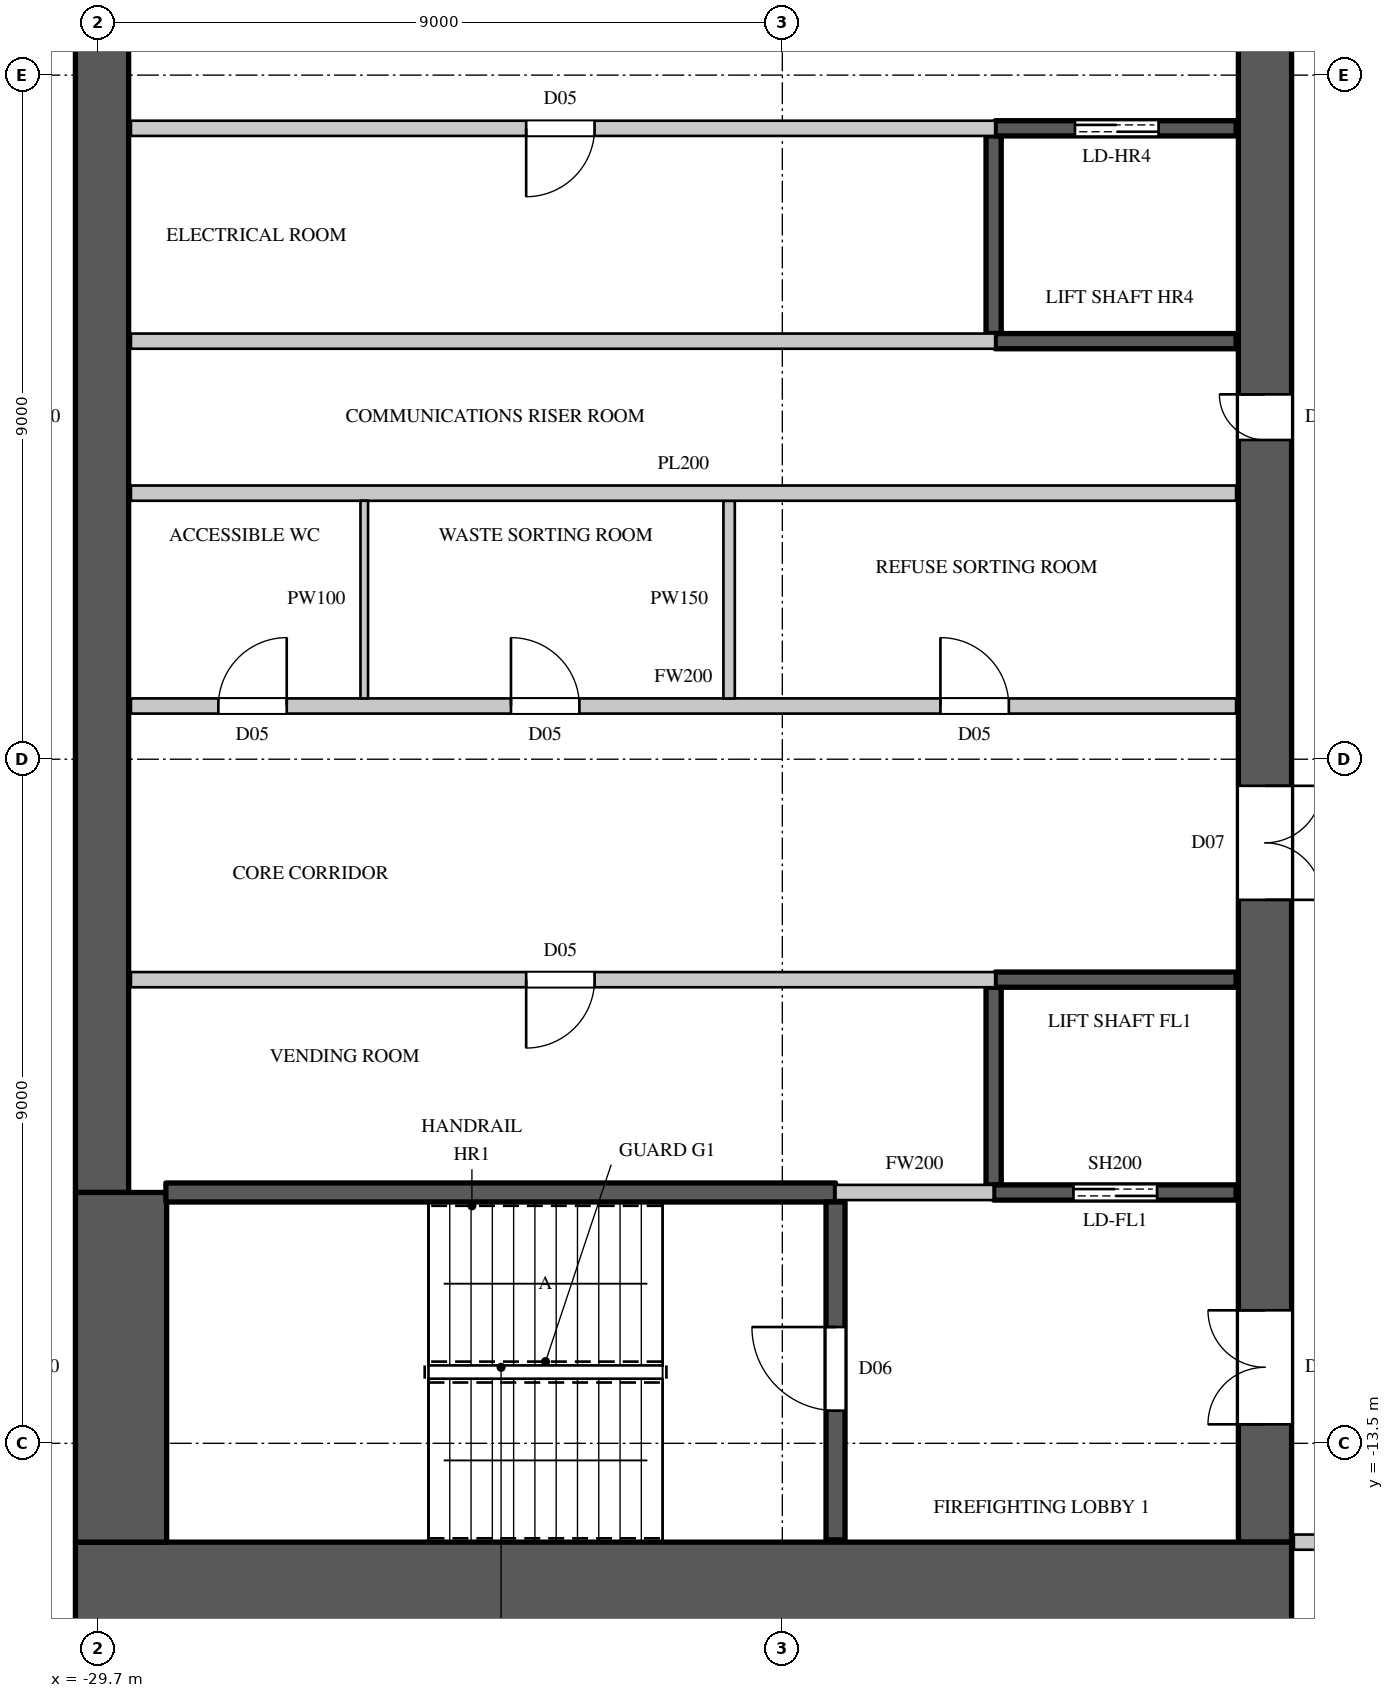
"""IFC4 building model, lengths in metres.
Left out: names, types, materials, properties, quantities, classifications, styles, units other than length and angle.
Written with IfcOpenShell. Run it as: python <this file> out.ifc"""

import sys

from ifc_helpers import new_model, si_unit, direction, frame, frame_2d, origin, place, context, subcontext, project, spatial, rectangle, extrude, element, fill, save


model = new_model("IFC4")
c1 = context("Model", 3, precision=1e-05, world=origin(), true_north=direction((0.0, 1.0)))
c2 = subcontext(c1, "Body", "Model", "MODEL_VIEW")
j1 = project(units=[si_unit("LENGTHUNIT", "METRE"), si_unit("PLANEANGLEUNIT", "RADIAN")], contexts=[c1])
p1 = place(None, origin())
s1 = spatial("IfcSite", under=j1, at=p1, CompositionType="ELEMENT")
p2 = place(p1, origin())
s2 = spatial("IfcBuilding", under=s1, at=p2, CompositionType="ELEMENT")
p3 = place(p2, frame((0.0, 0.0, 280.3)))
s3 = spatial("IfcBuildingStorey", under=s2, at=p3, CompositionType="ELEMENT", Elevation=280.3)
p4 = place(p3, frame((-30.0, -15.4, 0.0), z_axis=(0.0, 0.0, 1.0), x_axis=(1.0, 0.0, 0.0)))
e1 = element("IfcWall", 1, at=p4, inside=s3, PredefinedType="SHEAR", context=c2, shape_type="SweptSolid", body=[
    extrude(rectangle(XDim=16.0, YDim=1.2, at=frame_2d((8.0, 0.0))), origin(), (0.0, 0.0, 1.0), 4.1),
])
p5 = place(p3, frame((-14.35, -14.8, 0.0), z_axis=(0.0, 0.0, 1.0), x_axis=(0.0, 1.0, 0.0)))
e2 = element("IfcWall", 2, at=p5, inside=s3, PredefinedType="SHEAR", context=c2, shape_type="SweptSolid", body=[
    extrude(rectangle(XDim=29.6, YDim=0.7, at=frame_2d((14.8, 0.0))), origin(), (0.0, 0.0, 1.0), 4.1),
])
p6 = place(p5, frame((1.55, 0.0, 0.0)))
e3 = element("IfcOpeningElement", 3, at=p6, cuts=e2, PredefinedType="OPENING", context=c2, shape_type="SweptSolid", body=[
    extrude(rectangle(XDim=1.5, YDim=2.4, at=frame_2d((0.75, 1.2))), frame((0.0, 0.36, 0.0), z_axis=(0.0, -1.0, 0.0), x_axis=(1.0, 0.0, 0.0)), (0.0, 0.0, 1.0), 0.72),
])
p7 = place(p5, frame((26.55, 0.0, 0.0)))
e4 = element("IfcOpeningElement", 4, at=p7, cuts=e2, PredefinedType="OPENING", context=c2, shape_type="SweptSolid", body=[
    extrude(rectangle(XDim=1.5, YDim=2.4, at=frame_2d((0.75, 1.2))), frame((0.0, 0.36, 0.0), z_axis=(0.0, -1.0, 0.0), x_axis=(1.0, 0.0, 0.0)), (0.0, 0.0, 1.0), 0.72),
])
p8 = place(p5, frame((8.45, 0.0, 0.0)))
e5 = element("IfcOpeningElement", 5, at=p8, cuts=e2, PredefinedType="OPENING", context=c2, shape_type="SweptSolid", body=[
    extrude(rectangle(XDim=1.5, YDim=2.4, at=frame_2d((0.75, 1.2))), frame((0.0, 0.36, 0.0), z_axis=(0.0, -1.0, 0.0), x_axis=(1.0, 0.0, 0.0)), (0.0, 0.0, 1.0), 0.72),
])
p9 = place(p5, frame((19.65, 0.0, 0.0)))
e6 = element("IfcOpeningElement", 6, at=p9, cuts=e2, PredefinedType="OPENING", context=c2, shape_type="SweptSolid", body=[
    extrude(rectangle(XDim=1.5, YDim=2.4, at=frame_2d((0.75, 1.2))), frame((0.0, 0.36, 0.0), z_axis=(0.0, -1.0, 0.0), x_axis=(1.0, 0.0, 0.0)), (0.0, 0.0, 1.0), 0.72),
])
p10 = place(p5, frame((14.5, 0.0, 0.0)))
e7 = element("IfcOpeningElement", 7, at=p10, cuts=e2, PredefinedType="OPENING", context=c2, shape_type="SweptSolid", body=[
    extrude(rectangle(XDim=0.6, YDim=2.0, at=frame_2d((0.3, 1.0))), frame((0.0, 0.36, 0.0), z_axis=(0.0, -1.0, 0.0), x_axis=(1.0, 0.0, 0.0)), (0.0, 0.0, 1.0), 0.72),
])
p11 = place(p3, frame((-29.65, -10.2, 0.0), z_axis=(0.0, 0.0, 1.0), x_axis=(0.0, 1.0, 0.0)))
e8 = element("IfcWall", 8, at=p11, inside=s3, PredefinedType="SHEAR", context=c2, shape_type="SweptSolid", body=[
    extrude(rectangle(XDim=20.4, YDim=0.7, at=frame_2d((10.2, 0.0))), origin(), (0.0, 0.0, 1.0), 4.1),
])
p12 = place(p3, frame((-29.4, -14.8, 0.0), z_axis=(0.0, 0.0, 1.0), x_axis=(0.0, 1.0, 0.0)))
e9 = element("IfcWall", 9, at=p12, inside=s3, PredefinedType="SHEAR", context=c2, shape_type="SweptSolid", body=[
    extrude(rectangle(XDim=4.6, YDim=1.2, at=frame_2d((2.3, 0.0))), origin(), (0.0, 0.0, 1.0), 4.1),
])
p13 = place(p3, frame((-29.27, -7.4, 0.0), z_axis=(0.0, 0.0, 1.0), x_axis=(1.0, 0.0, 0.0)))
e10 = element("IfcWall", 10, at=p13, inside=s3, PredefinedType="PARTITIONING", context=c2, shape_type="SweptSolid", body=[
    extrude(rectangle(XDim=11.37, YDim=0.2, at=frame_2d((5.685, 0.0))), origin(), (0.0, 0.0, 1.0), 3.8),
])
p14 = place(p13, frame((5.2, 0.0, 0.0)))
e11 = element("IfcOpeningElement", 11, at=p14, cuts=e10, PredefinedType="OPENING", context=c2, shape_type="SweptSolid", body=[
    extrude(rectangle(XDim=0.9, YDim=2.2, at=frame_2d((0.45, 1.1))), frame((0.0, 0.11, 0.0), z_axis=(0.0, -1.0, 0.0), x_axis=(1.0, 0.0, 0.0)), (0.0, 0.0, 1.0), 0.22),
])
p15 = place(p3, frame((-29.27, -3.8, 0.0), z_axis=(0.0, 0.0, 1.0), x_axis=(1.0, 0.0, 0.0)))
e12 = element("IfcWall", 12, at=p15, inside=s3, PredefinedType="PARTITIONING", context=c2, shape_type="SweptSolid", body=[
    extrude(rectangle(XDim=14.54, YDim=0.2, at=frame_2d((7.27, 0.0))), origin(), (0.0, 0.0, 1.0), 3.8),
])
p16 = place(p15, frame((1.15, 0.0, 0.0)))
e13 = element("IfcOpeningElement", 13, at=p16, cuts=e12, PredefinedType="OPENING", context=c2, shape_type="SweptSolid", body=[
    extrude(rectangle(XDim=0.9, YDim=2.2, at=frame_2d((0.45, 1.1))), frame((0.0, 0.11, 0.0), z_axis=(0.0, -1.0, 0.0), x_axis=(1.0, 0.0, 0.0)), (0.0, 0.0, 1.0), 0.22),
])
p17 = place(p15, frame((5.0, 0.0, 0.0)))
e14 = element("IfcOpeningElement", 14, at=p17, cuts=e12, PredefinedType="OPENING", context=c2, shape_type="SweptSolid", body=[
    extrude(rectangle(XDim=0.9, YDim=2.2, at=frame_2d((0.45, 1.1))), frame((0.0, 0.11, 0.0), z_axis=(0.0, -1.0, 0.0), x_axis=(1.0, 0.0, 0.0)), (0.0, 0.0, 1.0), 0.22),
])
p18 = place(p15, frame((10.65, 0.0, 0.0)))
e15 = element("IfcOpeningElement", 15, at=p18, cuts=e12, PredefinedType="OPENING", context=c2, shape_type="SweptSolid", body=[
    extrude(rectangle(XDim=0.9, YDim=2.2, at=frame_2d((0.45, 1.1))), frame((0.0, 0.11, 0.0), z_axis=(0.0, -1.0, 0.0), x_axis=(1.0, 0.0, 0.0)), (0.0, 0.0, 1.0), 0.22),
])
p19 = place(p3, frame((-20.0, -10.2, 0.0), z_axis=(0.0, 0.0, 1.0), x_axis=(1.0, 0.0, 0.0)))
e16 = element("IfcWall", 16, at=p19, inside=s3, PredefinedType="PARTITIONING", context=c2, shape_type="SweptSolid", body=[
    extrude(rectangle(XDim=2.08, YDim=0.2, at=frame_2d((1.04, 0.0))), origin(), (0.0, 0.0, 1.0), 3.8),
])
p20 = place(p3, frame((-13.97, -14.8, 0.0), z_axis=(0.0, 0.0, 1.0), x_axis=(1.0, 0.0, 0.0)))
e17 = element("IfcWall", 17, at=p20, inside=s3, PredefinedType="PARTITIONING", context=c2, shape_type="SweptSolid", body=[
    extrude(rectangle(XDim=2.87, YDim=0.2, at=frame_2d((1.435, 0.0))), origin(), (0.0, 0.0, 1.0), 3.8),
])
p21 = place(p3, frame((-21.4, -3.7, 0.0), z_axis=(0.0, 0.0, 1.0), x_axis=(0.0, 1.0, 0.0)))
e18 = element("IfcWall", 18, at=p21, inside=s3, PredefinedType="PARTITIONING", context=c2, shape_type="SweptSolid", body=[
    extrude(rectangle(XDim=2.6, YDim=0.15, at=frame_2d((1.3, 0.0))), origin(), (0.0, 0.0, 1.0), 3.8),
])
p22 = place(p3, frame((-29.27, -1.0, 0.0), z_axis=(0.0, 0.0, 1.0), x_axis=(1.0, 0.0, 0.0)))
e19 = element("IfcWall", 19, at=p22, inside=s3, PredefinedType="PARTITIONING", context=c2, shape_type="SweptSolid", body=[
    extrude(rectangle(XDim=14.54, YDim=0.2, at=frame_2d((7.27, 0.0))), origin(), (0.0, 0.0, 1.0), 3.8),
])
p23 = place(p3, frame((-29.27, 1.0, 0.0), z_axis=(0.0, 0.0, 1.0), x_axis=(1.0, 0.0, 0.0)))
e20 = element("IfcWall", 20, at=p23, inside=s3, PredefinedType="PARTITIONING", context=c2, shape_type="SweptSolid", body=[
    extrude(rectangle(XDim=11.37, YDim=0.2, at=frame_2d((5.685, 0.0))), origin(), (0.0, 0.0, 1.0), 3.8),
])
p24 = place(p3, frame((-29.27, 3.8, 0.0), z_axis=(0.0, 0.0, 1.0), x_axis=(1.0, 0.0, 0.0)))
e21 = element("IfcWall", 21, at=p24, inside=s3, PredefinedType="PARTITIONING", context=c2, shape_type="SweptSolid", body=[
    extrude(rectangle(XDim=11.37, YDim=0.2, at=frame_2d((5.685, 0.0))), origin(), (0.0, 0.0, 1.0), 3.8),
])
p25 = place(p24, frame((5.2, 0.0, 0.0)))
e22 = element("IfcOpeningElement", 22, at=p25, cuts=e21, PredefinedType="OPENING", context=c2, shape_type="SweptSolid", body=[
    extrude(rectangle(XDim=0.9, YDim=2.2, at=frame_2d((0.45, 1.1))), frame((0.0, 0.11, 0.0), z_axis=(0.0, -1.0, 0.0), x_axis=(1.0, 0.0, 0.0)), (0.0, 0.0, 1.0), 0.22),
])
p26 = place(p3, frame((-17.92, -10.1, 0.0), z_axis=(0.0, 0.0, 1.0), x_axis=(0.0, 1.0, 0.0)))
e23 = element("IfcWall", 23, at=p26, inside=s3, PredefinedType="SHEAR", context=c2, shape_type="SweptSolid", body=[
    extrude(rectangle(XDim=2.6, YDim=0.2, at=frame_2d((1.3, 0.0))), origin(), (0.0, 0.0, 1.0), 3.8),
])
p27 = place(p3, frame((-17.92, -10.2, 0.0), z_axis=(0.0, 0.0, 1.0), x_axis=(1.0, 0.0, 0.0)))
e24 = element("IfcWall", 24, at=p27, inside=s3, PredefinedType="SHEAR", context=c2, shape_type="SweptSolid", body=[
    extrude(rectangle(XDim=3.19, YDim=0.2, at=frame_2d((1.595, 0.0))), origin(), (0.0, 0.0, 1.0), 3.8),
])
p28 = place(p27, frame((1.05, 0.0, 0.0)))
e25 = element("IfcOpeningElement", 25, at=p28, cuts=e24, PredefinedType="OPENING", context=c2, shape_type="SweptSolid", body=[
    extrude(rectangle(XDim=1.1, YDim=2.2, at=frame_2d((0.55, 1.1))), frame((0.0, 0.11, 0.0), z_axis=(0.0, -1.0, 0.0), x_axis=(1.0, 0.0, 0.0)), (0.0, 0.0, 1.0), 0.22),
])
p29 = place(p3, frame((-17.9, -7.4, 0.0), z_axis=(0.0, 0.0, 1.0), x_axis=(1.0, 0.0, 0.0)))
e26 = element("IfcWall", 26, at=p29, inside=s3, PredefinedType="SHEAR", context=c2, shape_type="SweptSolid", body=[
    extrude(rectangle(XDim=3.17, YDim=0.2, at=frame_2d((1.585, 0.0))), origin(), (0.0, 0.0, 1.0), 3.8),
])
p30 = place(p3, frame((-17.92, 1.1, 0.0), z_axis=(0.0, 0.0, 1.0), x_axis=(0.0, 1.0, 0.0)))
e27 = element("IfcWall", 27, at=p30, inside=s3, PredefinedType="SHEAR", context=c2, shape_type="SweptSolid", body=[
    extrude(rectangle(XDim=2.6, YDim=0.2, at=frame_2d((1.3, 0.0))), origin(), (0.0, 0.0, 1.0), 3.8),
])
p31 = place(p3, frame((-17.9, 1.0, 0.0), z_axis=(0.0, 0.0, 1.0), x_axis=(1.0, 0.0, 0.0)))
e28 = element("IfcWall", 28, at=p31, inside=s3, PredefinedType="SHEAR", context=c2, shape_type="SweptSolid", body=[
    extrude(rectangle(XDim=3.17, YDim=0.2, at=frame_2d((1.585, 0.0))), origin(), (0.0, 0.0, 1.0), 3.8),
])
p32 = place(p3, frame((-17.9, 3.8, 0.0), z_axis=(0.0, 0.0, 1.0), x_axis=(1.0, 0.0, 0.0)))
e29 = element("IfcWall", 29, at=p32, inside=s3, PredefinedType="SHEAR", context=c2, shape_type="SweptSolid", body=[
    extrude(rectangle(XDim=3.17, YDim=0.2, at=frame_2d((1.585, 0.0))), origin(), (0.0, 0.0, 1.0), 3.8),
])
p33 = place(p32, frame((1.05, 0.0, 0.0)))
e30 = element("IfcOpeningElement", 30, at=p33, cuts=e29, PredefinedType="OPENING", context=c2, shape_type="SweptSolid", body=[
    extrude(rectangle(XDim=1.1, YDim=2.2, at=frame_2d((0.55, 1.1))), frame((0.0, 0.11, 0.0), z_axis=(0.0, -1.0, 0.0), x_axis=(1.0, 0.0, 0.0)), (0.0, 0.0, 1.0), 0.22),
])
p34 = place(p3, frame((-28.81, -10.2, 0.0), z_axis=(0.0, 0.0, 1.0), x_axis=(1.0, 0.0, 0.0)))
e31 = element("IfcWall", 31, at=p34, inside=s3, PredefinedType="SHEAR", context=c2, shape_type="SweptSolid", body=[
    extrude(rectangle(XDim=8.81, YDim=0.25, at=frame_2d((4.405, 0.0))), origin(), (0.0, 0.0, 1.0), 3.8),
])
p35 = place(p3, frame((-20.0, -14.77, 0.0), z_axis=(0.0, 0.0, 1.0), x_axis=(0.0, 1.0, 0.0)))
e32 = element("IfcWall", 32, at=p35, inside=s3, PredefinedType="SHEAR", context=c2, shape_type="SweptSolid", body=[
    extrude(rectangle(XDim=4.445, YDim=0.25, at=frame_2d((2.223, 0.0))), origin(), (0.0, 0.0, 1.0), 3.8),
])
p36 = place(p35, frame((1.7, 0.0, 0.0)))
e33 = element("IfcOpeningElement", 33, at=p36, cuts=e32, PredefinedType="OPENING", context=c2, shape_type="SweptSolid", body=[
    extrude(rectangle(XDim=1.1, YDim=2.2, at=frame_2d((0.55, 1.1))), frame((0.0, 0.135, 0.0), z_axis=(0.0, -1.0, 0.0), x_axis=(1.0, 0.0, 0.0)), (0.0, 0.0, 1.0), 0.27),
])
p37 = place(p3, frame((-26.2, -3.7, 0.0), z_axis=(0.0, 0.0, 1.0), x_axis=(0.0, 1.0, 0.0)))
e34 = element("IfcWall", 34, at=p37, inside=s3, PredefinedType="PARTITIONING", context=c2, shape_type="SweptSolid", body=[
    extrude(rectangle(XDim=2.6, YDim=0.1, at=frame_2d((1.3, 0.0))), origin(), (0.0, 0.0, 1.0), 3.8),
])
p38 = place(p36, origin())
e35 = element("IfcDoor", 35, at=p38, inside=s3, OperationType="SINGLE_SWING_RIGHT", PredefinedType="DOOR", context=c2, shape_type="SweptSolid", body=[
    extrude(rectangle(XDim=1.1, YDim=2.2, at=frame_2d((0.55, 1.1))), frame((0.0, 0.025, 0.0), z_axis=(0.0, -1.0, 0.0), x_axis=(1.0, 0.0, 0.0)), (0.0, 0.0, 1.0), 0.05),
])
fill(e33, e35)
p39 = place(p14, origin())
e36 = element("IfcDoor", 36, at=p39, inside=s3, OperationType="SINGLE_SWING_RIGHT", PredefinedType="DOOR", context=c2, shape_type="SweptSolid", body=[
    extrude(rectangle(XDim=0.9, YDim=2.2, at=frame_2d((0.45, 1.1))), frame((0.0, 0.025, 0.0), z_axis=(0.0, -1.0, 0.0), x_axis=(1.0, 0.0, 0.0)), (0.0, 0.0, 1.0), 0.05),
])
fill(e11, e36)
p40 = place(p16, origin())
e37 = element("IfcDoor", 37, at=p40, inside=s3, OperationType="SINGLE_SWING_RIGHT", PredefinedType="DOOR", context=c2, shape_type="SweptSolid", body=[
    extrude(rectangle(XDim=0.9, YDim=2.2, at=frame_2d((0.45, 1.1))), frame((0.0, 0.025, 0.0), z_axis=(0.0, -1.0, 0.0), x_axis=(1.0, 0.0, 0.0)), (0.0, 0.0, 1.0), 0.05),
])
fill(e13, e37)
p41 = place(p17, origin())
e38 = element("IfcDoor", 38, at=p41, inside=s3, OperationType="SINGLE_SWING_LEFT", PredefinedType="DOOR", context=c2, shape_type="SweptSolid", body=[
    extrude(rectangle(XDim=0.9, YDim=2.2, at=frame_2d((0.45, 1.1))), frame((0.0, 0.025, 0.0), z_axis=(0.0, -1.0, 0.0), x_axis=(1.0, 0.0, 0.0)), (0.0, 0.0, 1.0), 0.05),
])
fill(e14, e38)
p42 = place(p18, origin())
e39 = element("IfcDoor", 39, at=p42, inside=s3, OperationType="SINGLE_SWING_LEFT", PredefinedType="DOOR", context=c2, shape_type="SweptSolid", body=[
    extrude(rectangle(XDim=0.9, YDim=2.2, at=frame_2d((0.45, 1.1))), frame((0.0, 0.025, 0.0), z_axis=(0.0, -1.0, 0.0), x_axis=(1.0, 0.0, 0.0)), (0.0, 0.0, 1.0), 0.05),
])
fill(e15, e39)
p43 = place(p25, origin())
e40 = element("IfcDoor", 40, at=p43, inside=s3, OperationType="SINGLE_SWING_RIGHT", PredefinedType="DOOR", context=c2, shape_type="SweptSolid", body=[
    extrude(rectangle(XDim=0.9, YDim=2.2, at=frame_2d((0.45, 1.1))), frame((0.0, 0.025, 0.0), z_axis=(0.0, -1.0, 0.0), x_axis=(1.0, 0.0, 0.0)), (0.0, 0.0, 1.0), 0.05),
])
fill(e22, e40)
p44 = place(p28, origin())
e41 = element("IfcDoor", 41, at=p44, inside=s3, OperationType="DOUBLE_DOOR_SLIDING", PredefinedType="DOOR", context=c2, shape_type="SweptSolid", body=[
    extrude(rectangle(XDim=1.1, YDim=2.2, at=frame_2d((0.55, 1.1))), frame((0.0, 0.025, 0.0), z_axis=(0.0, -1.0, 0.0), x_axis=(1.0, 0.0, 0.0)), (0.0, 0.0, 1.0), 0.05),
])
fill(e25, e41)
p45 = place(p33, origin())
e42 = element("IfcDoor", 42, at=p45, inside=s3, OperationType="DOUBLE_DOOR_SLIDING", PredefinedType="DOOR", context=c2, shape_type="SweptSolid", body=[
    extrude(rectangle(XDim=1.1, YDim=2.2, at=frame_2d((0.55, 1.1))), frame((0.0, 0.025, 0.0), z_axis=(0.0, -1.0, 0.0), x_axis=(1.0, 0.0, 0.0)), (0.0, 0.0, 1.0), 0.05),
])
fill(e30, e42)
p46 = place(p6, origin())
e43 = element("IfcDoor", 43, at=p46, inside=s3, OperationType="DOUBLE_DOOR_SINGLE_SWING", PredefinedType="DOOR", context=c2, shape_type="SweptSolid", body=[
    extrude(rectangle(XDim=1.5, YDim=2.4, at=frame_2d((0.75, 1.2))), frame((0.0, 0.345, 0.0), z_axis=(0.0, -1.0, 0.0), x_axis=(1.0, 0.0, 0.0)), (0.0, 0.0, 1.0), 0.05),
])
fill(e3, e43)
p47 = place(p8, origin())
e44 = element("IfcDoor", 44, at=p47, inside=s3, OperationType="DOUBLE_DOOR_SINGLE_SWING", PredefinedType="DOOR", context=c2, shape_type="SweptSolid", body=[
    extrude(rectangle(XDim=1.5, YDim=2.4, at=frame_2d((0.75, 1.2))), frame((0.0, -0.295, 0.0), z_axis=(0.0, -1.0, 0.0), x_axis=(1.0, 0.0, 0.0)), (0.0, 0.0, 1.0), 0.05),
])
fill(e5, e44)
p48 = place(p10, origin())
e45 = element("IfcDoor", 45, at=p48, inside=s3, OperationType="SINGLE_SWING_RIGHT", PredefinedType="DOOR", context=c2, shape_type="SweptSolid", body=[
    extrude(rectangle(XDim=0.6, YDim=2.0, at=frame_2d((0.3, 1.0))), frame((0.0, 0.345, 0.0), z_axis=(0.0, -1.0, 0.0), x_axis=(1.0, 0.0, 0.0)), (0.0, 0.0, 1.0), 0.05),
])
fill(e7, e45)
save(model, sys.argv[1])
